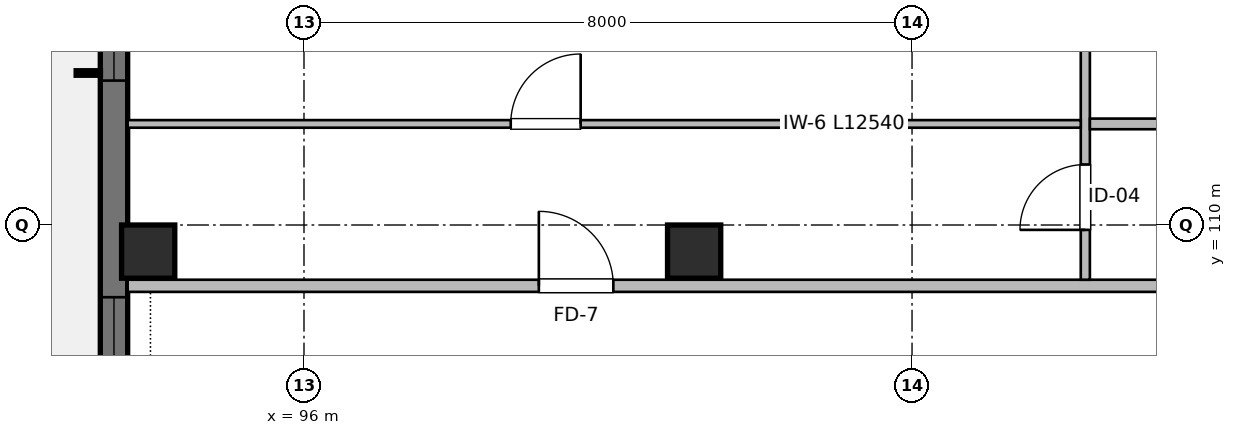
"""IFC4 building model, lengths in metres.
Left out: names, types, materials, properties, quantities, classifications, styles, units other than length and angle.
Written with IfcOpenShell. Run it as: python <this file> out.ifc"""

import sys

from ifc_helpers import new_model, si_unit, direction, frame, frame_2d, origin, origin_2d, place, context, subcontext, project, spatial, rectangle, extrude, element, fill, save


model = new_model("IFC4")
c1 = context("Model", 3, precision=1e-05, world=origin(), true_north=direction((0.0, 1.0)))
c2 = subcontext(c1, "Body", "Model", "MODEL_VIEW")
j1 = project(units=[si_unit("LENGTHUNIT", "METRE"), si_unit("PLANEANGLEUNIT", "RADIAN")], contexts=[c1])
p1 = place(None, origin())
s1 = spatial("IfcSite", under=j1, at=p1, CompositionType="ELEMENT")
p2 = place(p1, origin())
s2 = spatial("IfcBuilding", under=s1, at=p2, CompositionType="ELEMENT")
p3 = place(p2, frame((0.0, 0.0, 7.36)))
s3 = spatial("IfcBuildingStorey", under=s2, at=p3, CompositionType="ELEMENT", Elevation=7.36)
for number, where, z_axis, x_axis in (
    (1, (93.95, 109.65, 0.0), (0.0, 0.0, 1.0), (1.0, 0.0, 0.0)),
    (2, (101.133, 109.65, 0.0), (0.0, 0.0, 1.0), (1.0, 0.0, 0.0)),
):
    element("IfcColumn", number, at=place(p3, frame(where, z_axis=z_axis, x_axis=x_axis)), inside=s3, PredefinedType="COLUMN", context=c2, shape_type="SweptSolid", body=[
        extrude(rectangle(XDim=0.7, YDim=0.7, at=origin_2d()), origin(), (0.0, 0.0, 1.0), 3.2),
    ])
p4 = place(p3, frame((93.5, 100.0, 0.0), z_axis=(0.0, 0.0, 1.0), x_axis=(0.0, 1.0, 0.0)))
e3 = element("IfcWall", 3, at=p4, inside=s3, PredefinedType="SHEAR", context=c2, shape_type="SweptSolid", body=[
    extrude(rectangle(XDim=16.0, YDim=0.36, at=frame_2d((8.0, 0.0))), origin(), (0.0, 0.0, 1.0), 2.98),
])
p5 = place(p4, frame((3.4, 0.0, 0.0)))
e4 = element("IfcOpeningElement", 4, at=p5, cuts=e3, PredefinedType="OPENING", context=c2, shape_type="SweptSolid", body=[
    extrude(rectangle(XDim=1.2, YDim=2.2, at=frame_2d((0.6, 1.1))), frame((0.0, 0.19, 0.0), z_axis=(0.0, -1.0, 0.0), x_axis=(1.0, 0.0, 0.0)), (0.0, 0.0, 1.0), 0.38),
])
p6 = place(p4, frame((7.1, 0.0, 0.72)))
e5 = element("IfcOpeningElement", 5, at=p6, cuts=e3, PredefinedType="OPENING", context=c2, shape_type="SweptSolid", body=[
    extrude(rectangle(XDim=1.95, YDim=1.5, at=frame_2d((0.975, 0.75))), frame((0.0, 0.19, 0.0), z_axis=(0.0, -1.0, 0.0), x_axis=(1.0, 0.0, 0.0)), (0.0, 0.0, 1.0), 0.38),
])
p7 = place(p4, frame((11.9, 0.0, 0.62)))
e6 = element("IfcOpeningElement", 6, at=p7, cuts=e3, PredefinedType="OPENING", context=c2, shape_type="SweptSolid", body=[
    extrude(rectangle(XDim=1.1, YDim=1.6, at=frame_2d((0.55, 0.8))), frame((0.0, 0.19, 0.0), z_axis=(0.0, -1.0, 0.0), x_axis=(1.0, 0.0, 0.0)), (0.0, 0.0, 1.0), 0.38),
])
p8 = place(p3, frame((93.68, 109.2, 0.0), z_axis=(0.0, 0.0, 1.0), x_axis=(1.0, 0.0, 0.0)))
e7 = element("IfcWall", 7, at=p8, inside=s3, PredefinedType="PARTITIONING", context=c2, shape_type="SweptSolid", body=[
    extrude(rectangle(XDim=43.64, YDim=0.16, at=frame_2d((21.82, 0.0))), origin(), (0.0, 0.0, 1.0), 2.935),
])
p9 = place(p8, frame((5.41, 0.0, 0.0)))
e8 = element("IfcOpeningElement", 8, at=p9, cuts=e7, PredefinedType="OPENING", context=c2, shape_type="SweptSolid", body=[
    extrude(rectangle(XDim=0.98, YDim=2.15, at=frame_2d((0.49, 1.075))), frame((0.0, 0.09, 0.0), z_axis=(0.0, -1.0, 0.0), x_axis=(1.0, 0.0, 0.0)), (0.0, 0.0, 1.0), 0.18),
])
p10 = place(p8, frame((27.32, 0.0, 0.0)))
e9 = element("IfcOpeningElement", 9, at=p10, cuts=e7, PredefinedType="OPENING", context=c2, shape_type="SweptSolid", body=[
    extrude(rectangle(XDim=0.98, YDim=2.15, at=frame_2d((0.49, 1.075))), frame((0.0, 0.09, 0.0), z_axis=(0.0, -1.0, 0.0), x_axis=(1.0, 0.0, 0.0)), (0.0, 0.0, 1.0), 0.18),
])
p11 = place(p3, frame((106.28, 109.28, 0.0), z_axis=(0.0, 0.0, 1.0), x_axis=(0.0, 1.0, 0.0)))
e10 = element("IfcWall", 10, at=p11, inside=s3, PredefinedType="PARTITIONING", context=c2, shape_type="SweptSolid", body=[
    extrude(rectangle(XDim=6.59, YDim=0.12, at=frame_2d((3.295, 0.0))), origin(), (0.0, 0.0, 1.0), 2.935),
])
p12 = place(p11, frame((0.656, 0.0, 0.0)))
e11 = element("IfcOpeningElement", 11, at=p12, cuts=e10, PredefinedType="OPENING", context=c2, shape_type="SweptSolid", body=[
    extrude(rectangle(XDim=0.86, YDim=2.1, at=frame_2d((0.43, 1.05))), frame((0.0, 0.07, 0.0), z_axis=(0.0, -1.0, 0.0), x_axis=(1.0, 0.0, 0.0)), (0.0, 0.0, 1.0), 0.14),
])
p13 = place(p11, frame((4.093, 0.0, 0.0)))
e12 = element("IfcOpeningElement", 12, at=p13, cuts=e10, PredefinedType="OPENING", context=c2, shape_type="SweptSolid", body=[
    extrude(rectangle(XDim=0.9, YDim=2.1, at=frame_2d((0.45, 1.05))), frame((0.0, 0.07, 0.0), z_axis=(0.0, -1.0, 0.0), x_axis=(1.0, 0.0, 0.0)), (0.0, 0.0, 1.0), 0.14),
])
p14 = place(p3, frame((106.34, 111.33, 0.0), z_axis=(0.0, 0.0, 1.0), x_axis=(1.0, 0.0, 0.0)))
e13 = element("IfcWall", 13, at=p14, inside=s3, PredefinedType="PARTITIONING", context=c2, shape_type="SweptSolid", body=[
    extrude(rectangle(XDim=9.07, YDim=0.14, at=frame_2d((4.535, 0.0))), origin(), (0.0, 0.0, 1.0), 2.935),
])
p15 = place(p14, frame((3.652, 0.0, 0.0)))
e14 = element("IfcOpeningElement", 14, at=p15, cuts=e13, PredefinedType="OPENING", context=c2, shape_type="SweptSolid", body=[
    extrude(rectangle(XDim=0.85, YDim=2.05, at=frame_2d((0.425, 1.025))), frame((0.0, 0.08, 0.0), z_axis=(0.0, -1.0, 0.0), x_axis=(1.0, 0.0, 0.0)), (0.0, 0.0, 1.0), 0.16),
])
p16 = place(p3, frame((93.68, 111.33, 0.0), z_axis=(0.0, 0.0, 1.0), x_axis=(1.0, 0.0, 0.0)))
e15 = element("IfcWall", 15, at=p16, inside=s3, PredefinedType="PARTITIONING", context=c2, shape_type="SweptSolid", body=[
    extrude(rectangle(XDim=12.54, YDim=0.1, at=frame_2d((6.27, 0.0))), origin(), (0.0, 0.0, 1.0), 2.935),
])
p17 = place(p16, frame((5.04, 0.0, 0.0)))
e16 = element("IfcOpeningElement", 16, at=p17, cuts=e15, PredefinedType="OPENING", context=c2, shape_type="SweptSolid", body=[
    extrude(rectangle(XDim=0.92, YDim=2.1, at=frame_2d((0.46, 1.05))), frame((0.0, 0.06, 0.0), z_axis=(0.0, -1.0, 0.0), x_axis=(1.0, 0.0, 0.0)), (0.0, 0.0, 1.0), 0.12),
])
p18 = place(p6, origin())
e17 = element("IfcWindow", 17, at=p18, inside=s3, PartitioningType="SINGLE_PANEL", PredefinedType="WINDOW", context=c2, shape_type="SweptSolid", body=[
    extrude(rectangle(XDim=1.95, YDim=1.5, at=frame_2d((0.975, 0.75))), frame((0.0, 0.03, 0.0), z_axis=(0.0, -1.0, 0.0), x_axis=(1.0, 0.0, 0.0)), (0.0, 0.0, 1.0), 0.06),
])
fill(e5, e17)
p19 = place(p7, origin())
e18 = element("IfcWindow", 18, at=p19, inside=s3, PartitioningType="SINGLE_PANEL", PredefinedType="WINDOW", context=c2, shape_type="SweptSolid", body=[
    extrude(rectangle(XDim=1.1, YDim=1.6, at=frame_2d((0.55, 0.8))), frame((0.0, 0.03, 0.0), z_axis=(0.0, -1.0, 0.0), x_axis=(1.0, 0.0, 0.0)), (0.0, 0.0, 1.0), 0.06),
])
fill(e6, e18)
p20 = place(p9, origin())
e19 = element("IfcDoor", 19, at=p20, inside=s3, OperationType="SINGLE_SWING_LEFT", PredefinedType="DOOR", context=c2, shape_type="SweptSolid", body=[
    extrude(rectangle(XDim=0.98, YDim=2.15, at=frame_2d((0.49, 1.075))), frame((0.0, 0.025, 0.0), z_axis=(0.0, -1.0, 0.0), x_axis=(1.0, 0.0, 0.0)), (0.0, 0.0, 1.0), 0.05),
])
fill(e8, e19)
p21 = place(p17, origin())
e20 = element("IfcDoor", 20, at=p21, inside=s3, OperationType="SINGLE_SWING_RIGHT", PredefinedType="DOOR", context=c2, shape_type="SweptSolid", body=[
    extrude(rectangle(XDim=0.92, YDim=2.1, at=frame_2d((0.46, 1.05))), frame((0.0, 0.025, 0.0), z_axis=(0.0, -1.0, 0.0), x_axis=(1.0, 0.0, 0.0)), (0.0, 0.0, 1.0), 0.05),
])
fill(e16, e20)
p22 = place(p12, origin())
e21 = element("IfcDoor", 21, at=p22, inside=s3, OperationType="SINGLE_SWING_LEFT", PredefinedType="DOOR", context=c2, shape_type="SweptSolid", body=[
    extrude(rectangle(XDim=0.86, YDim=2.1, at=frame_2d((0.43, 1.05))), frame((0.0, 0.025, 0.0), z_axis=(0.0, -1.0, 0.0), x_axis=(1.0, 0.0, 0.0)), (0.0, 0.0, 1.0), 0.05),
])
fill(e11, e21)
save(model, sys.argv[1])
